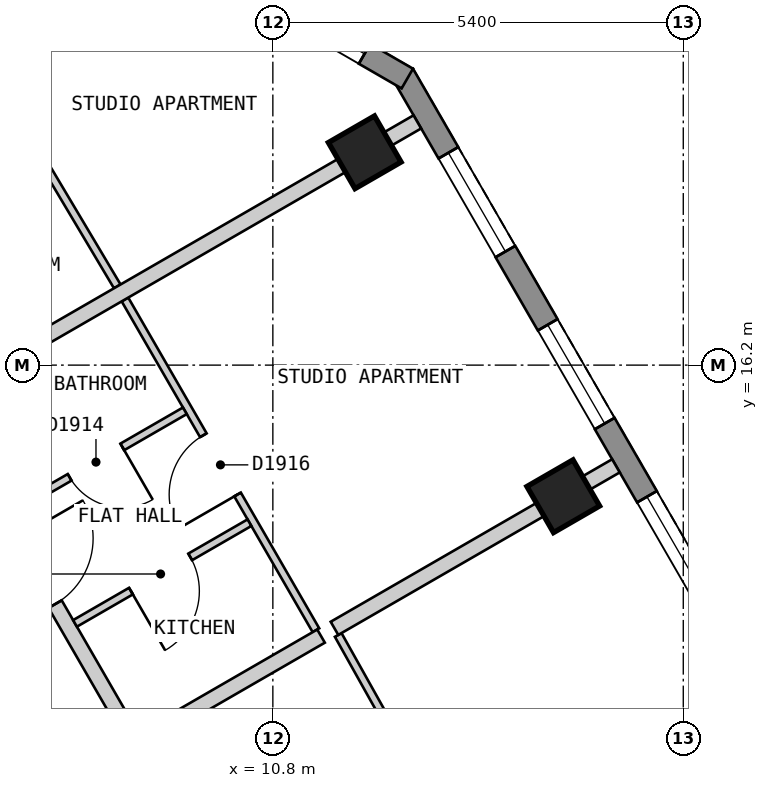
"""IFC4 building model, lengths in metres.
Left out: names, types, materials, properties, quantities, classifications, styles, units other than length and angle.
Written with IfcOpenShell. Run it as: python <this file> out.ifc"""

import sys

from ifc_helpers import new_model, si_unit, direction, frame, frame_2d, origin, origin_2d, place, context, subcontext, project, spatial, polyline, rectangle, outline, extrude, element, fill, save


model = new_model("IFC4")
c1 = context("Model", 3, precision=1e-05, world=origin(), true_north=direction((0.0, 1.0)))
c2 = subcontext(c1, "Body", "Model", "MODEL_VIEW")
j1 = project(units=[si_unit("LENGTHUNIT", "METRE"), si_unit("PLANEANGLEUNIT", "RADIAN")], contexts=[c1])
p1 = place(None, origin())
s1 = spatial("IfcSite", under=j1, at=p1, CompositionType="ELEMENT")
p2 = place(p1, origin())
s2 = spatial("IfcBuilding", under=s1, at=p2, CompositionType="ELEMENT")
p3 = place(p2, frame((0.0, 0.0, 220.8)))
s3 = spatial("IfcBuildingStorey", under=s2, at=p3, CompositionType="ELEMENT", Elevation=220.8)
for number, where, z_axis, x_axis in (
    (1, (14.621, 14.475, 0.0), (0.0, 0.0, 1.0), (-0.5, 0.866, 0.0)),
    (2, (12.009, 19.0, 0.0), (0.0, 0.0, 1.0), (-0.5, 0.866, 0.0)),
):
    element("IfcColumn", number, at=place(p3, frame(where, z_axis=z_axis, x_axis=x_axis)), inside=s3, PredefinedType="COLUMN", context=c2, shape_type="SweptSolid", body=[
        extrude(rectangle(XDim=0.7, YDim=0.7, at=origin_2d()), origin(), (0.0, 0.0, 1.0), 3.0),
    ])
p4 = place(p3, frame((23.599, 0.825, 0.0), z_axis=(0.0, 0.0, 1.0), x_axis=(-0.500003656944, 0.866023292436, 0.0)))
e3 = element("IfcWall", 3, at=p4, inside=s3, PredefinedType="SOLIDWALL", context=c2, shape_type="SweptSolid", body=[
    extrude(outline(polyline([(0.0, -0.15), (22.17, -0.15), (22.09, 0.15), (0.08, 0.15), (0.0, -0.15)])), origin(), (0.0, 0.0, 1.0), 2.7),
])
p5 = place(p4, frame((1.191, 0.0, 0.15)))
e4 = element("IfcOpeningElement", 4, at=p5, cuts=e3, PredefinedType="OPENING", context=c2, shape_type="SweptSolid", body=[
    extrude(rectangle(XDim=1.5, YDim=2.1, at=frame_2d((0.75, 1.05))), frame((0.0, 0.16, 0.0), z_axis=(0.0, -1.0, 0.0), x_axis=(1.0, 0.0, 0.0)), (0.0, 0.0, 1.0), 0.32),
])
p6 = place(p4, frame((3.804, 0.0, 0.15)))
e5 = element("IfcOpeningElement", 5, at=p6, cuts=e3, PredefinedType="OPENING", context=c2, shape_type="SweptSolid", body=[
    extrude(rectangle(XDim=1.5, YDim=2.1, at=frame_2d((0.75, 1.05))), frame((0.0, 0.16, 0.0), z_axis=(0.0, -1.0, 0.0), x_axis=(1.0, 0.0, 0.0)), (0.0, 0.0, 1.0), 0.32),
])
p7 = place(p4, frame((6.417, 0.0, 0.15)))
e6 = element("IfcOpeningElement", 6, at=p7, cuts=e3, PredefinedType="OPENING", context=c2, shape_type="SweptSolid", body=[
    extrude(rectangle(XDim=1.5, YDim=2.1, at=frame_2d((0.75, 1.05))), frame((0.0, 0.16, 0.0), z_axis=(0.0, -1.0, 0.0), x_axis=(1.0, 0.0, 0.0)), (0.0, 0.0, 1.0), 0.32),
])
p8 = place(p4, frame((9.029, 0.0, 0.15)))
e7 = element("IfcOpeningElement", 7, at=p8, cuts=e3, PredefinedType="OPENING", context=c2, shape_type="SweptSolid", body=[
    extrude(rectangle(XDim=1.5, YDim=2.1, at=frame_2d((0.75, 1.05))), frame((0.0, 0.16, 0.0), z_axis=(0.0, -1.0, 0.0), x_axis=(1.0, 0.0, 0.0)), (0.0, 0.0, 1.0), 0.32),
])
p9 = place(p4, frame((11.641, 0.0, 0.15)))
e8 = element("IfcOpeningElement", 8, at=p9, cuts=e3, PredefinedType="OPENING", context=c2, shape_type="SweptSolid", body=[
    extrude(rectangle(XDim=1.5, YDim=2.1, at=frame_2d((0.75, 1.05))), frame((0.0, 0.16, 0.0), z_axis=(0.0, -1.0, 0.0), x_axis=(1.0, 0.0, 0.0)), (0.0, 0.0, 1.0), 0.32),
])
p10 = place(p4, frame((14.254, 0.0, 0.15)))
e9 = element("IfcOpeningElement", 9, at=p10, cuts=e3, PredefinedType="OPENING", context=c2, shape_type="SweptSolid", body=[
    extrude(rectangle(XDim=1.5, YDim=2.1, at=frame_2d((0.75, 1.05))), frame((0.0, 0.16, 0.0), z_axis=(0.0, -1.0, 0.0), x_axis=(1.0, 0.0, 0.0)), (0.0, 0.0, 1.0), 0.32),
])
p11 = place(p4, frame((16.866, 0.0, 0.15)))
e10 = element("IfcOpeningElement", 10, at=p11, cuts=e3, PredefinedType="OPENING", context=c2, shape_type="SweptSolid", body=[
    extrude(rectangle(XDim=1.5, YDim=2.1, at=frame_2d((0.75, 1.05))), frame((0.0, 0.16, 0.0), z_axis=(0.0, -1.0, 0.0), x_axis=(1.0, 0.0, 0.0)), (0.0, 0.0, 1.0), 0.32),
])
p12 = place(p4, frame((19.479, 0.0, 0.15)))
e11 = element("IfcOpeningElement", 11, at=p12, cuts=e3, PredefinedType="OPENING", context=c2, shape_type="SweptSolid", body=[
    extrude(rectangle(XDim=1.5, YDim=2.1, at=frame_2d((0.75, 1.05))), frame((0.0, 0.16, 0.0), z_axis=(0.0, -1.0, 0.0), x_axis=(1.0, 0.0, 0.0)), (0.0, 0.0, 1.0), 0.32),
])
p13 = place(p3, frame((12.569, 19.97, 0.0), z_axis=(0.0, 0.0, 1.0), x_axis=(-0.866022959057, 0.500004234368, 0.0)))
e12 = element("IfcWall", 12, at=p13, inside=s3, PredefinedType="SOLIDWALL", context=c2, shape_type="SweptSolid", body=[
    extrude(outline(polyline([(0.0, -0.15), (5.0, -0.15), (4.92, 0.15), (0.08, 0.15), (0.0, -0.15)])), origin(), (0.0, 0.0, 1.0), 2.7),
])
p14 = place(p13, frame((0.65, 0.0, 0.15)))
e13 = element("IfcOpeningElement", 13, at=p14, cuts=e12, PredefinedType="OPENING", context=c2, shape_type="SweptSolid", body=[
    extrude(rectangle(XDim=1.2, YDim=2.1, at=frame_2d((0.6, 1.05))), frame((0.0, 0.16, 0.0), z_axis=(0.0, -1.0, 0.0), x_axis=(1.0, 0.0, 0.0)), (0.0, 0.0, 1.0), 0.32),
])
p15 = place(p13, frame((3.15, 0.0, 0.15)))
e14 = element("IfcOpeningElement", 14, at=p15, cuts=e12, PredefinedType="OPENING", context=c2, shape_type="SweptSolid", body=[
    extrude(rectangle(XDim=1.2, YDim=2.1, at=frame_2d((0.6, 1.05))), frame((0.0, 0.16, 0.0), z_axis=(0.0, -1.0, 0.0), x_axis=(1.0, 0.0, 0.0)), (0.0, 0.0, 1.0), 0.32),
])
p16 = place(p3, frame((5.485, 17.3, 0.0), z_axis=(0.0, 0.0, 1.0), x_axis=(0.499943285704, -0.866058145322, 0.0)))
e15 = element("IfcWall", 15, at=p16, inside=s3, PredefinedType="PARTITIONING", context=c2, shape_type="SweptSolid", body=[
    extrude(rectangle(XDim=10.623, YDim=0.2, at=frame_2d((5.312, 0.0))), origin(), (0.0, 0.0, 1.0), 2.7),
])
p17 = place(p16, frame((3.901, 0.0, 0.0)))
e16 = element("IfcOpeningElement", 16, at=p17, cuts=e15, PredefinedType="OPENING", context=c2, shape_type="SweptSolid", body=[
    extrude(rectangle(XDim=1.0, YDim=2.1, at=frame_2d((0.5, 1.05))), frame((0.0, 0.11, 0.0), z_axis=(0.0, -1.0, 0.0), x_axis=(1.0, 0.0, 0.0)), (0.0, 0.0, 1.0), 0.22),
])
p18 = place(p3, frame((7.414, 19.484, 0.0), z_axis=(0.0, 0.0, 1.0), x_axis=(0.511734837015, -0.859143443544, 0.0)))
e17 = element("IfcWall", 17, at=p18, inside=s3, PredefinedType="PARTITIONING", context=c2, shape_type="SweptSolid", body=[
    extrude(rectangle(XDim=2.616, YDim=0.1, at=frame_2d((1.308, 0.0))), origin(), (0.0, 0.0, 1.0), 2.7),
])
p19 = place(p3, frame((8.854, 17.064, 0.0), z_axis=(0.0, 0.0, 1.0), x_axis=(0.500042049778, -0.866001124973, 0.0)))
e18 = element("IfcWall", 18, at=p19, inside=s3, PredefinedType="PARTITIONING", context=c2, shape_type="SweptSolid", body=[
    extrude(rectangle(XDim=5.025, YDim=0.1, at=frame_2d((2.513, 0.0))), origin(), (0.0, 0.0, 1.0), 2.7),
])
p20 = place(p19, frame((2.063, 0.0, 0.0)))
e19 = element("IfcOpeningElement", 19, at=p20, cuts=e18, PredefinedType="OPENING", context=c2, shape_type="SweptSolid", body=[
    extrude(rectangle(XDim=0.9, YDim=2.1, at=frame_2d((0.45, 1.05))), frame((0.0, 0.06, 0.0), z_axis=(0.0, -1.0, 0.0), x_axis=(1.0, 0.0, 0.0)), (0.0, 0.0, 1.0), 0.12),
])
p21 = place(p3, frame((11.66, 12.65, 0.0), z_axis=(0.0, 0.0, 1.0), x_axis=(0.488650242737, -0.872479764965, 0.0)))
e20 = element("IfcWall", 20, at=p21, inside=s3, PredefinedType="PARTITIONING", context=c2, shape_type="SweptSolid", body=[
    extrude(rectangle(XDim=5.075, YDim=0.1, at=frame_2d((2.538, 0.0))), origin(), (0.0, 0.0, 1.0), 2.7),
])
p22 = place(p21, frame((2.113, 0.0, 0.0)))
e21 = element("IfcOpeningElement", 21, at=p22, cuts=e20, PredefinedType="OPENING", context=c2, shape_type="SweptSolid", body=[
    extrude(rectangle(XDim=0.8, YDim=2.1, at=frame_2d((0.4, 1.05))), frame((0.0, 0.06, 0.0), z_axis=(0.0, -1.0, 0.0), x_axis=(1.0, 0.0, 0.0)), (0.0, 0.0, 1.0), 0.12),
])
p23 = place(p3, frame((8.197, 12.802, 0.0), z_axis=(0.0, 0.0, 1.0), x_axis=(0.866029095148, 0.499993606316, 0.0)))
e22 = element("IfcWall", 22, at=p23, inside=s3, PredefinedType="PARTITIONING", context=c2, shape_type="SweptSolid", body=[
    extrude(rectangle(XDim=2.65, YDim=0.1, at=frame_2d((1.325, 0.0))), origin(), (0.0, 0.0, 1.0), 2.7),
])
p24 = place(p23, frame((0.85, 0.0, 0.0)))
e23 = element("IfcOpeningElement", 23, at=p24, cuts=e22, PredefinedType="OPENING", context=c2, shape_type="SweptSolid", body=[
    extrude(rectangle(XDim=0.9, YDim=2.1, at=frame_2d((0.45, 1.05))), frame((0.0, 0.06, 0.0), z_axis=(0.0, -1.0, 0.0), x_axis=(1.0, 0.0, 0.0)), (0.0, 0.0, 1.0), 0.12),
])
p25 = place(p3, frame((7.347, 14.274, 0.0), z_axis=(0.0, 0.0, 1.0), x_axis=(0.86601223543, 0.500022807565, 0.0)))
e24 = element("IfcWall", 24, at=p25, inside=s3, PredefinedType="PARTITIONING", context=c2, shape_type="SweptSolid", body=[
    extrude(rectangle(XDim=2.65, YDim=0.1, at=frame_2d((1.325, 0.0))), origin(), (0.0, 0.0, 1.0), 2.7),
])
p26 = place(p25, frame((0.9, 0.0, 0.0)))
e25 = element("IfcOpeningElement", 25, at=p26, cuts=e24, PredefinedType="OPENING", context=c2, shape_type="SweptSolid", body=[
    extrude(rectangle(XDim=0.8, YDim=2.1, at=frame_2d((0.4, 1.05))), frame((0.0, 0.06, 0.0), z_axis=(0.0, -1.0, 0.0), x_axis=(1.0, 0.0, 0.0)), (0.0, 0.0, 1.0), 0.12),
])
p27 = place(p3, frame((9.079, 11.275, 0.0), z_axis=(0.0, 0.0, 1.0), x_axis=(0.865952340496, 0.500126527981, 0.0)))
e26 = element("IfcWall", 26, at=p27, inside=s3, PredefinedType="PARTITIONING", context=c2, shape_type="SweptSolid", body=[
    extrude(rectangle(XDim=2.719, YDim=0.2, at=frame_2d((1.36, 0.0))), origin(), (0.0, 0.0, 1.0), 2.7),
])
p28 = place(p3, frame((11.611, 12.737, 0.0), z_axis=(0.0, 0.0, 1.0), x_axis=(0.866017282483, 0.500014066243, 0.0)))
e27 = element("IfcWall", 27, at=p28, inside=s3, PredefinedType="PARTITIONING", context=c2, shape_type="SweptSolid", body=[
    extrude(rectangle(XDim=4.276, YDim=0.2, at=frame_2d((2.138, 0.0))), origin(), (0.0, 0.0, 1.0), 2.7),
])
p29 = place(p3, frame((7.68, 16.501, 0.0), z_axis=(0.0, 0.0, 1.0), x_axis=(0.86602149507, 0.500006770031, 0.0)))
e28 = element("IfcWall", 28, at=p29, inside=s3, PredefinedType="PARTITIONING", context=c2, shape_type="SweptSolid", body=[
    extrude(rectangle(XDim=5.798, YDim=0.2, at=frame_2d((2.899, 0.0))), origin(), (0.0, 0.0, 1.0), 2.7),
])
p30 = place(p10, origin())
e29 = element("IfcWindow", 29, at=p30, inside=s3, PartitioningType="SINGLE_PANEL", PredefinedType="WINDOW", context=c2, shape_type="SweptSolid", body=[
    extrude(rectangle(XDim=1.5, YDim=2.1, at=frame_2d((0.75, 1.05))), frame((0.0, 0.03, 0.0), z_axis=(0.0, -1.0, 0.0), x_axis=(1.0, 0.0, 0.0)), (0.0, 0.0, 1.0), 0.06),
])
fill(e9, e29)
p31 = place(p11, origin())
e30 = element("IfcWindow", 30, at=p31, inside=s3, PartitioningType="SINGLE_PANEL", PredefinedType="WINDOW", context=c2, shape_type="SweptSolid", body=[
    extrude(rectangle(XDim=1.5, YDim=2.1, at=frame_2d((0.75, 1.05))), frame((0.0, 0.03, 0.0), z_axis=(0.0, -1.0, 0.0), x_axis=(1.0, 0.0, 0.0)), (0.0, 0.0, 1.0), 0.06),
])
fill(e10, e30)
p32 = place(p12, origin())
e31 = element("IfcWindow", 31, at=p32, inside=s3, PartitioningType="SINGLE_PANEL", PredefinedType="WINDOW", context=c2, shape_type="SweptSolid", body=[
    extrude(rectangle(XDim=1.5, YDim=2.1, at=frame_2d((0.75, 1.05))), frame((0.0, 0.03, 0.0), z_axis=(0.0, -1.0, 0.0), x_axis=(1.0, 0.0, 0.0)), (0.0, 0.0, 1.0), 0.06),
])
fill(e11, e31)
p33 = place(p14, origin())
e32 = element("IfcWindow", 32, at=p33, inside=s3, PartitioningType="SINGLE_PANEL", PredefinedType="WINDOW", context=c2, shape_type="SweptSolid", body=[
    extrude(rectangle(XDim=1.2, YDim=2.1, at=frame_2d((0.6, 1.05))), frame((0.0, 0.03, 0.0), z_axis=(0.0, -1.0, 0.0), x_axis=(1.0, 0.0, 0.0)), (0.0, 0.0, 1.0), 0.06),
])
fill(e13, e32)
p34 = place(p17, origin())
e33 = element("IfcDoor", 33, at=p34, inside=s3, OperationType="SINGLE_SWING_LEFT", PredefinedType="DOOR", context=c2, shape_type="SweptSolid", body=[
    extrude(rectangle(XDim=1.0, YDim=2.1, at=frame_2d((0.5, 1.05))), frame((0.0, 0.025, 0.0), z_axis=(0.0, -1.0, 0.0), x_axis=(1.0, 0.0, 0.0)), (0.0, 0.0, 1.0), 0.05),
])
fill(e16, e33)
p35 = place(p26, origin())
e34 = element("IfcDoor", 34, at=p35, inside=s3, OperationType="SINGLE_SWING_RIGHT", PredefinedType="DOOR", context=c2, shape_type="SweptSolid", body=[
    extrude(rectangle(XDim=0.8, YDim=2.1, at=frame_2d((0.4, 1.05))), frame((0.0, 0.025, 0.0), z_axis=(0.0, -1.0, 0.0), x_axis=(1.0, 0.0, 0.0)), (0.0, 0.0, 1.0), 0.05),
])
fill(e25, e34)
p36 = place(p24, origin())
e35 = element("IfcDoor", 35, at=p36, inside=s3, OperationType="SINGLE_SWING_LEFT", PredefinedType="DOOR", context=c2, shape_type="SweptSolid", body=[
    extrude(rectangle(XDim=0.9, YDim=2.1, at=frame_2d((0.45, 1.05))), frame((0.0, 0.025, 0.0), z_axis=(0.0, -1.0, 0.0), x_axis=(1.0, 0.0, 0.0)), (0.0, 0.0, 1.0), 0.05),
])
fill(e23, e35)
p37 = place(p20, origin())
e36 = element("IfcDoor", 36, at=p37, inside=s3, OperationType="SINGLE_SWING_RIGHT", PredefinedType="DOOR", context=c2, shape_type="SweptSolid", body=[
    extrude(rectangle(XDim=0.9, YDim=2.1, at=frame_2d((0.45, 1.05))), frame((0.0, 0.025, 0.0), z_axis=(0.0, -1.0, 0.0), x_axis=(1.0, 0.0, 0.0)), (0.0, 0.0, 1.0), 0.05),
])
fill(e19, e36)
save(model, sys.argv[1])
